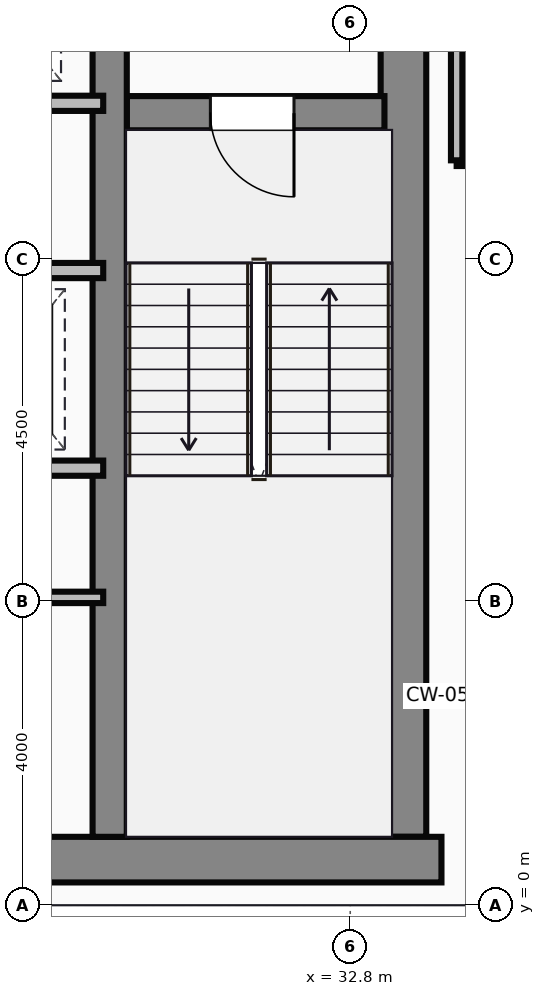
"""IFC4 building model, lengths in metres.
Left out: names, types, materials, properties, quantities, classifications, styles, units other than length and angle.
Written with IfcOpenShell. Run it as: python <this file> out.ifc"""

import sys

from ifc_helpers import new_model, si_unit, direction, frame, frame_2d, origin, place, context, subcontext, project, spatial, rectangle, extrude, source, transform, mapped, element, fill, save


model = new_model("IFC4")
c1 = context("Model", 3, precision=1e-05, world=origin(), true_north=direction((0.0, 1.0)))
c2 = subcontext(c1, "Body", "Model", "MODEL_VIEW")
j1 = project(units=[si_unit("LENGTHUNIT", "METRE"), si_unit("PLANEANGLEUNIT", "RADIAN")], contexts=[c1])
p1 = place(None, origin())
s1 = spatial("IfcSite", under=j1, at=p1, CompositionType="ELEMENT")
p2 = place(p1, origin())
s2 = spatial("IfcBuilding", under=s1, at=p2, CompositionType="ELEMENT")
p3 = place(p2, frame((0.0, 0.0, 225.1)))
s3 = spatial("IfcBuildingStorey", under=s2, at=p3, CompositionType="ELEMENT", Elevation=225.1)
m1 = source(origin(), c2, "Body", "SweptSolid", [
    extrude(rectangle(XDim=29.5, YDim=0.6, at=frame_2d((14.75, 0.0))), origin(), (0.0, 0.0, 1.0), 3.65),
])
p4 = place(p3, frame((4.5, 0.6, 0.0), z_axis=(0.0, 0.0, 1.0), x_axis=(1.0, 0.0, 0.0)))
e1 = element("IfcWall", 1, at=p4, inside=s3, PredefinedType="SHEAR", context=c2, shape_type="MappedRepresentation", body=[
    mapped(m1, transform((0.0, 0.0, 0.0))),
])
m2 = source(origin(), c2, "Body", "SweptSolid", [
    extrude(rectangle(XDim=13.1, YDim=0.6, at=frame_2d((6.55, 0.0))), origin(), (0.0, 0.0, 1.0), 3.65),
])
p5 = place(p3, frame((33.5, 0.9, 0.0), z_axis=(0.0, 0.0, 1.0), x_axis=(0.0, 1.0, 0.0)))
e2 = element("IfcWall", 2, at=p5, inside=s3, PredefinedType="SHEAR", context=c2, shape_type="MappedRepresentation", body=[
    mapped(m2, transform((0.0, 0.0, 0.0))),
])
m3 = source(origin(), c2, "Body", "SweptSolid", [
    extrude(rectangle(XDim=12.5, YDim=0.45, at=frame_2d((6.25, 0.0))), origin(), (0.0, 0.0, 1.0), 3.65),
])
p6 = place(p3, frame((29.635, 0.9, 0.0), z_axis=(0.0, 0.0, 1.0), x_axis=(0.0, 1.0, 0.0)))
e3 = element("IfcWall", 3, at=p6, inside=s3, PredefinedType="SHEAR", context=c2, shape_type="MappedRepresentation", body=[
    mapped(m3, transform((0.0, 0.0, 0.0))),
])
m4 = source(origin(), c2, "Body", "SweptSolid", [
    extrude(rectangle(XDim=3.39, YDim=0.45, at=frame_2d((1.695, 0.0))), origin(), (0.0, 0.0, 1.0), 3.65),
])
p7 = place(p3, frame((29.86, 10.42, 0.0), z_axis=(0.0, 0.0, 1.0), x_axis=(1.0, 0.0, 0.0)))
e4 = element("IfcWall", 4, at=p7, inside=s3, PredefinedType="SHEAR", context=c2, shape_type="MappedRepresentation", body=[
    mapped(m4, transform((0.0, 0.0, 0.0))),
])
p8 = place(p7, frame((1.1, 0.0, 0.0)))
e5 = element("IfcOpeningElement", 5, at=p8, cuts=e4, PredefinedType="OPENING", context=c2, shape_type="SweptSolid", body=[
    extrude(rectangle(XDim=1.1, YDim=2.15, at=frame_2d((0.55, 1.075))), frame((0.0, 0.235, 0.0), z_axis=(0.0, -1.0, 0.0), x_axis=(1.0, 0.0, 0.0)), (0.0, 0.0, 1.0), 0.47),
])
m5 = source(origin(), c2, "Body", "SweptSolid", [
    extrude(rectangle(XDim=8.8, YDim=0.2, at=frame_2d((4.4, 0.0))), origin(), (0.0, 0.0, 1.0), 3.4),
])
p9 = place(p3, frame((20.75, 10.55, 0.0), z_axis=(0.0, 0.0, 1.0), x_axis=(1.0, 0.0, 0.0)))
e6 = element("IfcWall", 6, at=p9, inside=s3, PredefinedType="PARTITIONING", context=c2, shape_type="MappedRepresentation", body=[
    mapped(m5, transform((0.0, 0.0, 0.0))),
])
p10 = place(p9, frame((0.5, 0.0, 0.0)))
e7 = element("IfcOpeningElement", 7, at=p10, cuts=e6, PredefinedType="OPENING", context=c2, shape_type="SweptSolid", body=[
    extrude(rectangle(XDim=1.05, YDim=2.15, at=frame_2d((0.525, 1.075))), frame((0.0, 0.11, 0.0), z_axis=(0.0, -1.0, 0.0), x_axis=(1.0, 0.0, 0.0)), (0.0, 0.0, 1.0), 0.22),
])
p11 = place(p9, frame((2.6, 0.0, 0.0)))
e8 = element("IfcOpeningElement", 8, at=p11, cuts=e6, PredefinedType="OPENING", context=c2, shape_type="SweptSolid", body=[
    extrude(rectangle(XDim=1.05, YDim=2.15, at=frame_2d((0.525, 1.075))), frame((0.0, 0.11, 0.0), z_axis=(0.0, -1.0, 0.0), x_axis=(1.0, 0.0, 0.0)), (0.0, 0.0, 1.0), 0.22),
])
p12 = place(p9, frame((4.7, 0.0, 0.0)))
e9 = element("IfcOpeningElement", 9, at=p12, cuts=e6, PredefinedType="OPENING", context=c2, shape_type="SweptSolid", body=[
    extrude(rectangle(XDim=1.05, YDim=2.15, at=frame_2d((0.525, 1.075))), frame((0.0, 0.11, 0.0), z_axis=(0.0, -1.0, 0.0), x_axis=(1.0, 0.0, 0.0)), (0.0, 0.0, 1.0), 0.22),
])
p13 = place(p9, frame((6.8, 0.0, 0.0)))
e10 = element("IfcOpeningElement", 10, at=p13, cuts=e6, PredefinedType="OPENING", context=c2, shape_type="SweptSolid", body=[
    extrude(rectangle(XDim=1.05, YDim=2.15, at=frame_2d((0.525, 1.075))), frame((0.0, 0.11, 0.0), z_axis=(0.0, -1.0, 0.0), x_axis=(1.0, 0.0, 0.0)), (0.0, 0.0, 1.0), 0.22),
])
m6 = source(origin(), c2, "Body", "SweptSolid", [
    extrude(rectangle(XDim=4.55, YDim=0.2, at=frame_2d((2.275, 0.0))), origin(), (0.0, 0.0, 1.0), 3.4),
])
p14 = place(p3, frame((25.0, 8.35, 0.0), z_axis=(0.0, 0.0, 1.0), x_axis=(1.0, 0.0, 0.0)))
e11 = element("IfcWall", 11, at=p14, inside=s3, PredefinedType="PARTITIONING", context=c2, shape_type="MappedRepresentation", body=[
    mapped(m6, transform((0.0, 0.0, 0.0))),
])
p15 = place(p14, frame((0.5, 0.0, 0.0)))
e12 = element("IfcOpeningElement", 12, at=p15, cuts=e11, PredefinedType="OPENING", context=c2, shape_type="SweptSolid", body=[
    extrude(rectangle(XDim=1.05, YDim=2.15, at=frame_2d((0.525, 1.075))), frame((0.0, 0.11, 0.0), z_axis=(0.0, -1.0, 0.0), x_axis=(1.0, 0.0, 0.0)), (0.0, 0.0, 1.0), 0.22),
])
p16 = place(p14, frame((2.6, 0.0, 0.0)))
e13 = element("IfcOpeningElement", 13, at=p16, cuts=e11, PredefinedType="OPENING", context=c2, shape_type="SweptSolid", body=[
    extrude(rectangle(XDim=1.05, YDim=2.15, at=frame_2d((0.525, 1.075))), frame((0.0, 0.11, 0.0), z_axis=(0.0, -1.0, 0.0), x_axis=(1.0, 0.0, 0.0)), (0.0, 0.0, 1.0), 0.22),
])
p17 = place(p3, frame((25.0, 5.75, 0.0), z_axis=(0.0, 0.0, 1.0), x_axis=(1.0, 0.0, 0.0)))
e14 = element("IfcWall", 14, at=p17, inside=s3, PredefinedType="PARTITIONING", context=c2, shape_type="MappedRepresentation", body=[
    mapped(m6, transform((0.0, 0.0, 0.0))),
])
m7 = source(origin(), c2, "Body", "SweptSolid", [
    extrude(rectangle(XDim=4.55, YDim=0.15, at=frame_2d((2.275, 0.0))), origin(), (0.0, 0.0, 1.0), 3.4),
])
p18 = place(p3, frame((25.0, 4.05, 0.0), z_axis=(0.0, 0.0, 1.0), x_axis=(1.0, 0.0, 0.0)))
e15 = element("IfcWall", 15, at=p18, inside=s3, PredefinedType="PARTITIONING", context=c2, shape_type="MappedRepresentation", body=[
    mapped(m7, transform((0.0, 0.0, 0.0))),
])
m8 = source(origin(), c2, "Body", "SweptSolid", [
    extrude(rectangle(XDim=4.8, YDim=0.15, at=frame_2d((2.4, 0.0))), origin(), (0.0, 0.0, 1.0), 3.4),
])
p19 = place(p3, frame((34.2, 9.8, 0.0), z_axis=(0.0, 0.0, 1.0), x_axis=(1.0, 0.0, 0.0)))
e16 = element("IfcWall", 16, at=p19, inside=s3, PredefinedType="PARTITIONING", context=c2, shape_type="MappedRepresentation", body=[
    mapped(m8, transform((0.0, 0.0, 0.0))),
])
m9 = source(origin(), c2, "Body", "SweptSolid", [
    extrude(rectangle(XDim=4.18, YDim=0.15, at=frame_2d((2.09, 0.0))), origin(), (0.0, 0.0, 1.0), 3.4),
])
p20 = place(p3, frame((34.2, 9.8, 0.0), z_axis=(0.0, 0.0, 1.0), x_axis=(0.0, 1.0, 0.0)))
e17 = element("IfcWall", 17, at=p20, inside=s3, PredefinedType="PARTITIONING", context=c2, shape_type="MappedRepresentation", body=[
    mapped(m9, transform((0.0, 0.0, 0.0))),
])
m10 = source(origin(), c2, "Body", "SweptSolid", [
    extrude(rectangle(XDim=1.1, YDim=2.15, at=frame_2d((0.55, 1.075))), frame((0.0, 0.025, 0.0), z_axis=(0.0, -1.0, 0.0), x_axis=(1.0, 0.0, 0.0)), (0.0, 0.0, 1.0), 0.05),
])
p21 = place(p8, frame((1.1, 0.0, 0.0), z_axis=(0.0, 0.0, 1.0), x_axis=(-1.0, 0.0, 0.0)))
e18 = element("IfcDoor", 18, at=p21, inside=s3, OperationType="SINGLE_SWING_RIGHT", PredefinedType="DOOR", context=c2, shape_type="MappedRepresentation", body=[
    mapped(m10, transform((0.0, 0.0, 0.0))),
])
fill(e5, e18)
save(model, sys.argv[1])
